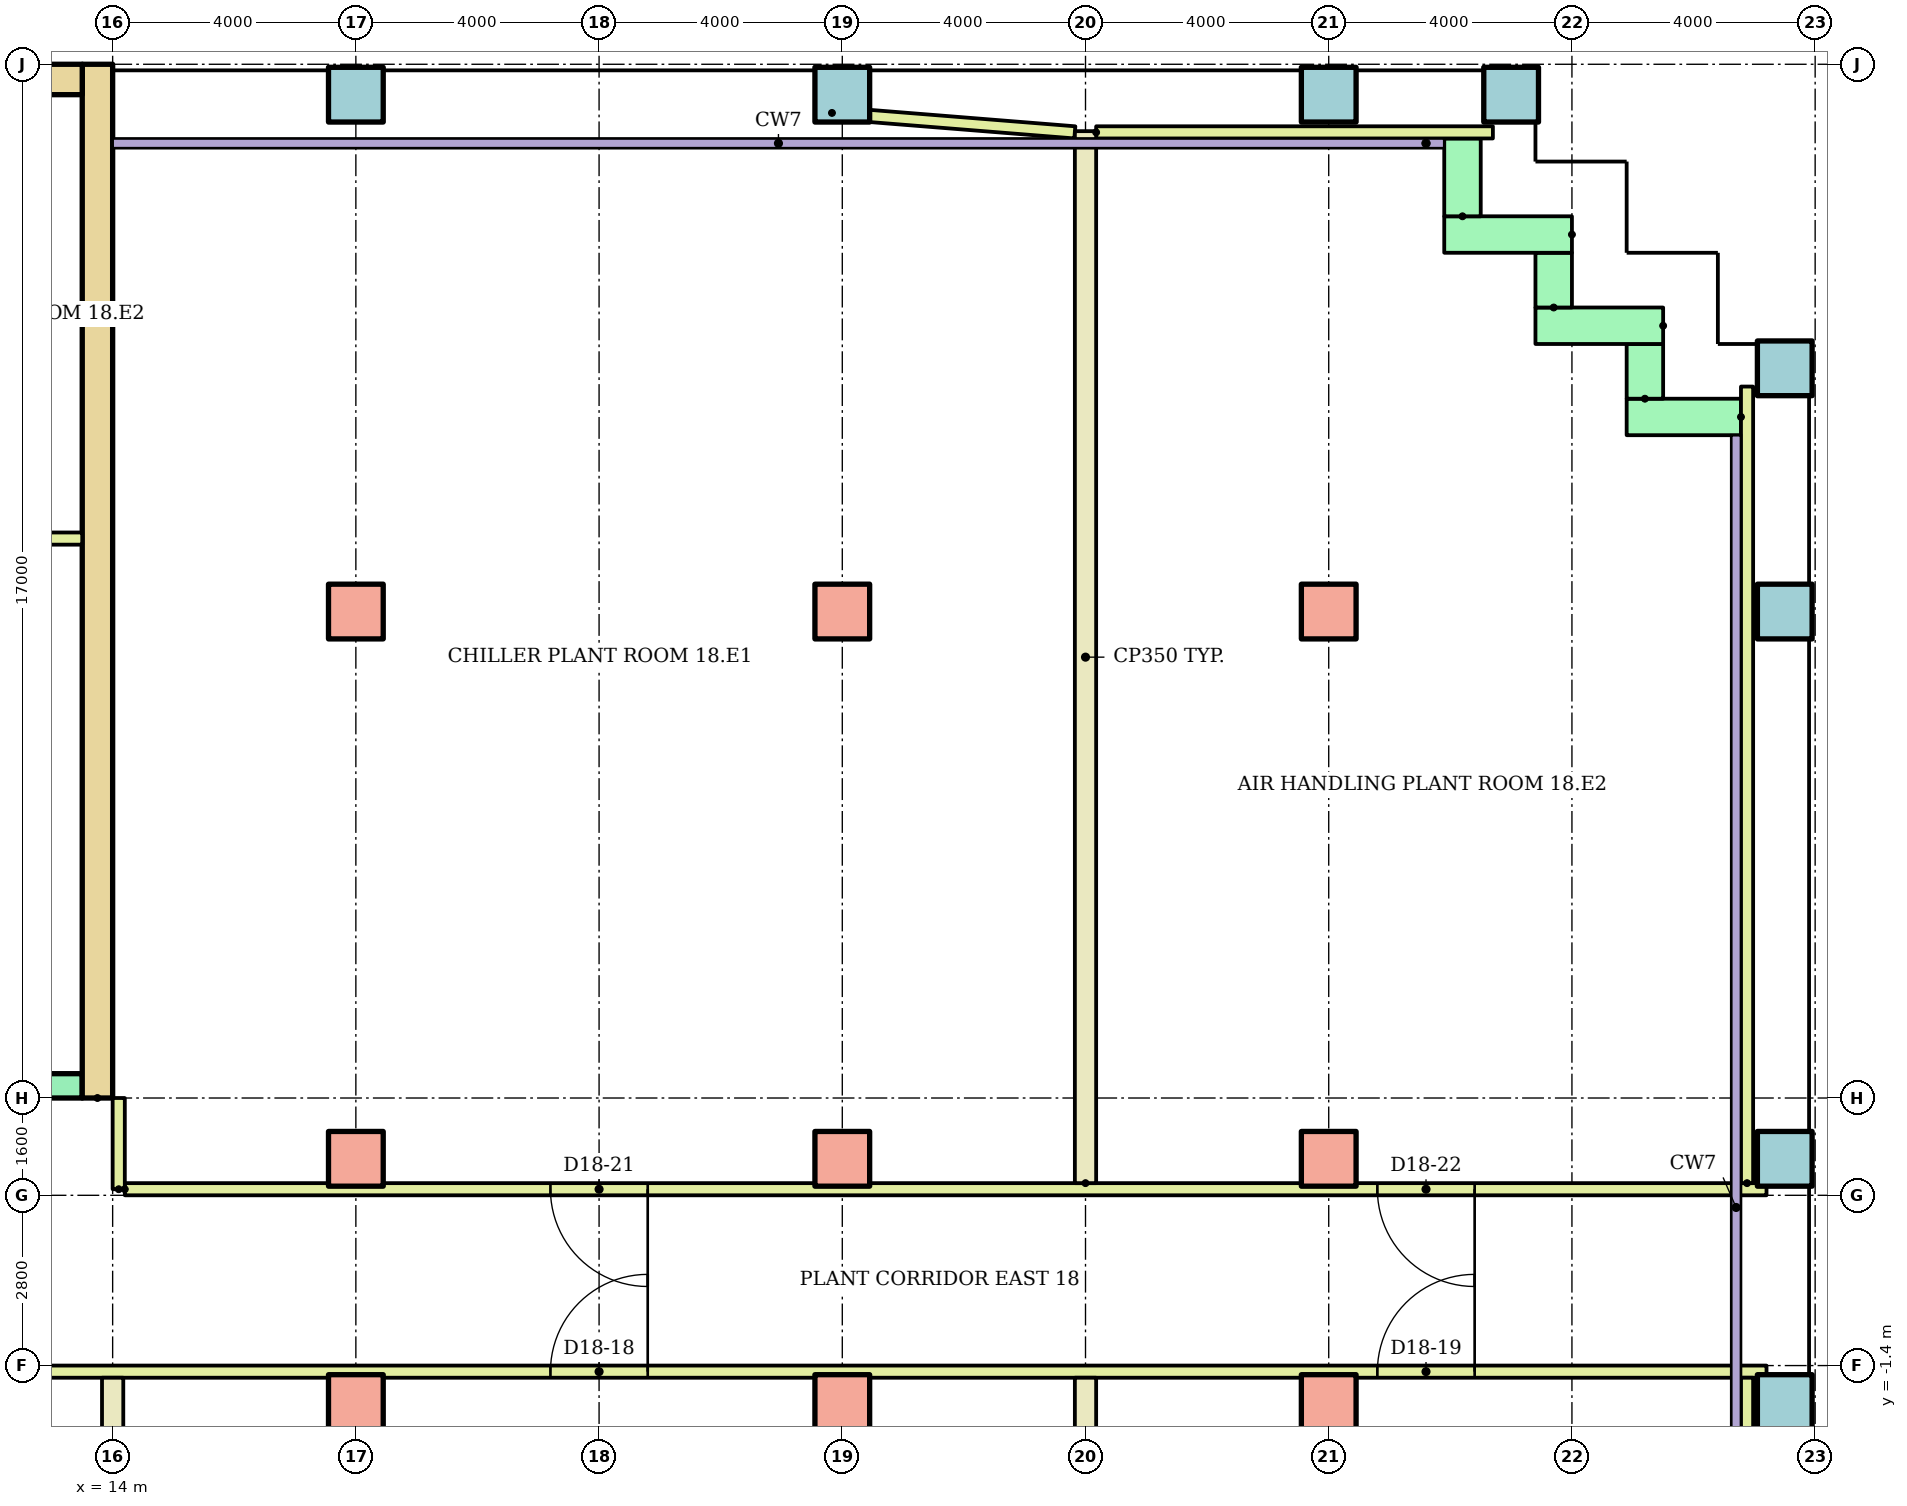
"""IFC4 building model, lengths in metres.
Left out: names, types, materials, properties, quantities, classifications, styles, units other than length and angle.
Written with IfcOpenShell. Run it as: python <this file> out.ifc"""

import sys

from ifc_helpers import new_model, si_unit, direction, frame, frame_2d, origin, origin_2d, place, context, subcontext, project, spatial, rectangle, hollow_rectangle, extrude, element, fill, save


model = new_model("IFC4")
c1 = context("Model", 3, precision=1e-05, world=origin(), true_north=direction((0.0, 1.0)))
c2 = subcontext(c1, "Body", "Model", "MODEL_VIEW")
j1 = project(units=[si_unit("LENGTHUNIT", "METRE"), si_unit("PLANEANGLEUNIT", "RADIAN")], contexts=[c1])
p1 = place(None, origin())
s1 = spatial("IfcSite", under=j1, at=p1, CompositionType="ELEMENT")
p2 = place(p1, origin())
s2 = spatial("IfcBuilding", under=s1, at=p2, CompositionType="ELEMENT")
p3 = place(p2, frame((0.0, 0.0, 73.6)))
s3 = spatial("IfcBuildingStorey", under=s2, at=p3, CompositionType="ELEMENT", Elevation=73.6)
for number, where in (
    (1, (18.0, -2.0, 0.0)),
    (2, (26.0, -2.0, 0.0)),
    (3, (34.0, -2.0, 0.0)),
):
    element("IfcColumn", number, at=place(p3, frame(where)), inside=s3, PredefinedType="COLUMN", context=c2, shape_type="SweptSolid", body=[
        extrude(rectangle(XDim=0.9, YDim=0.9, at=origin_2d()), origin(), (0.0, 0.0, 1.0), 3.9),
    ])
p4 = place(p3, frame((41.5, -2.0, 0.0)))
e4 = element("IfcColumn", 4, at=p4, inside=s3, PredefinedType="COLUMN", context=c2, shape_type="SweptSolid", body=[
    extrude(hollow_rectangle(XDim=0.9, YDim=0.9, WallThickness=0.045, at=origin_2d()), origin(), (0.0, 0.0, 1.0), 3.9),
])
for number, where in (
    (5, (18.0, 2.0, 0.0)),
    (6, (26.0, 2.0, 0.0)),
    (7, (34.0, 2.0, 0.0)),
):
    element("IfcColumn", number, at=place(p3, frame(where)), inside=s3, PredefinedType="COLUMN", context=c2, shape_type="SweptSolid", body=[
        extrude(rectangle(XDim=0.9, YDim=0.9, at=origin_2d()), origin(), (0.0, 0.0, 1.0), 3.9),
    ])
p5 = place(p3, frame((41.5, 2.0, 0.0)))
e8 = element("IfcColumn", 8, at=p5, inside=s3, PredefinedType="COLUMN", context=c2, shape_type="SweptSolid", body=[
    extrude(hollow_rectangle(XDim=0.9, YDim=0.9, WallThickness=0.045, at=origin_2d()), origin(), (0.0, 0.0, 1.0), 3.9),
])
for number, where in (
    (9, (18.0, 11.0, 0.0)),
    (10, (26.0, 11.0, 0.0)),
    (11, (34.0, 11.0, 0.0)),
):
    element("IfcColumn", number, at=place(p3, frame(where)), inside=s3, PredefinedType="COLUMN", context=c2, shape_type="SweptSolid", body=[
        extrude(rectangle(XDim=0.9, YDim=0.9, at=origin_2d()), origin(), (0.0, 0.0, 1.0), 3.9),
    ])
for number, where in (
    (12, (41.5, 11.0, 0.0)),
    (13, (41.5, 15.0, 0.0)),
    (14, (18.0, 19.5, 0.0)),
    (15, (26.0, 19.5, 0.0)),
    (16, (34.0, 19.5, 0.0)),
    (17, (37.0, 19.5, 0.0)),
):
    element("IfcColumn", number, at=place(p3, frame(where)), inside=s3, PredefinedType="COLUMN", context=c2, shape_type="SweptSolid", body=[
        extrude(hollow_rectangle(XDim=0.9, YDim=0.9, WallThickness=0.045, at=origin_2d()), origin(), (0.0, 0.0, 1.0), 3.9),
    ])
p6 = place(p3, frame((40.78, 14.2, 0.0), z_axis=(0.0, 0.0, 1.0), x_axis=(-1.0, 0.0, 0.0)))
e18 = element("IfcWall", 18, at=p6, inside=s3, PredefinedType="STANDARD", context=c2, shape_type="SweptSolid", body=[
    extrude(rectangle(XDim=1.88, YDim=0.6, at=frame_2d((0.94, 0.0))), origin(), (0.0, 0.0, 1.0), 3.62),
])
p7 = place(p3, frame((39.2, 14.5, 0.0), z_axis=(0.0, 0.0, 1.0), x_axis=(0.0, 1.0, 0.0)))
e19 = element("IfcWall", 19, at=p7, inside=s3, PredefinedType="STANDARD", context=c2, shape_type="SweptSolid", body=[
    extrude(rectangle(XDim=0.9, YDim=0.6, at=frame_2d((0.45, 0.0))), origin(), (0.0, 0.0, 1.0), 3.62),
])
p8 = place(p3, frame((39.5, 15.7, 0.0), z_axis=(0.0, 0.0, 1.0), x_axis=(-1.0, 0.0, 0.0)))
e20 = element("IfcWall", 20, at=p8, inside=s3, PredefinedType="STANDARD", context=c2, shape_type="SweptSolid", body=[
    extrude(rectangle(XDim=2.1, YDim=0.6, at=frame_2d((1.05, 0.0))), origin(), (0.0, 0.0, 1.0), 3.62),
])
p9 = place(p3, frame((37.7, 16.0, 0.0), z_axis=(0.0, 0.0, 1.0), x_axis=(0.0, 1.0, 0.0)))
e21 = element("IfcWall", 21, at=p9, inside=s3, PredefinedType="STANDARD", context=c2, shape_type="SweptSolid", body=[
    extrude(rectangle(XDim=0.9, YDim=0.6, at=frame_2d((0.45, 0.0))), origin(), (0.0, 0.0, 1.0), 3.62),
])
p10 = place(p3, frame((38.0, 17.2, 0.0), z_axis=(0.0, 0.0, 1.0), x_axis=(-1.0, 0.0, 0.0)))
e22 = element("IfcWall", 22, at=p10, inside=s3, PredefinedType="STANDARD", context=c2, shape_type="SweptSolid", body=[
    extrude(rectangle(XDim=2.1, YDim=0.6, at=frame_2d((1.05, 0.0))), origin(), (0.0, 0.0, 1.0), 3.62),
])
p11 = place(p3, frame((36.2, 17.5, 0.0), z_axis=(0.0, 0.0, 1.0), x_axis=(0.0, 1.0, 0.0)))
e23 = element("IfcWall", 23, at=p11, inside=s3, PredefinedType="STANDARD", context=c2, shape_type="SweptSolid", body=[
    extrude(rectangle(XDim=1.28, YDim=0.6, at=frame_2d((0.64, 0.0))), origin(), (0.0, 0.0, 1.0), 3.62),
])
p12 = place(p3, frame((13.75, 3.0, 0.0), z_axis=(0.0, 0.0, 1.0), x_axis=(0.0, 1.0, 0.0)))
e24 = element("IfcWall", 24, at=p12, inside=s3, PredefinedType="SHEAR", context=c2, shape_type="SweptSolid", body=[
    extrude(rectangle(XDim=17.0, YDim=0.5, at=frame_2d((8.5, 0.0))), origin(), (0.0, 0.0, 1.0), 3.62),
])
p13 = place(p3, frame((-13.5, 19.75, 0.0)))
e25 = element("IfcWall", 25, at=p13, inside=s3, PredefinedType="SHEAR", context=c2, shape_type="SweptSolid", body=[
    extrude(rectangle(XDim=27.0, YDim=0.5, at=frame_2d((13.5, 0.0))), origin(), (0.0, 0.0, 1.0), 3.62),
])
p14 = place(p3, frame((-13.5, 3.2, 0.0)))
e26 = element("IfcWall", 26, at=p14, inside=s3, PredefinedType="SHEAR", context=c2, shape_type="SweptSolid", body=[
    extrude(rectangle(XDim=27.0, YDim=0.4, at=frame_2d((13.5, 0.0))), origin(), (0.0, 0.0, 1.0), 3.62),
])
p15 = place(p14, frame((6.861, 0.0, 0.0)))
e27 = element("IfcOpeningElement", 27, at=p15, cuts=e26, PredefinedType="OPENING", context=c2, shape_type="SweptSolid", body=[
    extrude(rectangle(XDim=1.1, YDim=2.1, at=frame_2d((0.55, 1.05))), frame((0.0, 0.21, 0.0), z_axis=(0.0, -1.0, 0.0), x_axis=(1.0, 0.0, 0.0)), (0.0, 0.0, 1.0), 0.42),
])
p16 = place(p14, frame((9.906, 0.0, 0.0)))
e28 = element("IfcOpeningElement", 28, at=p16, cuts=e26, PredefinedType="OPENING", context=c2, shape_type="SweptSolid", body=[
    extrude(rectangle(XDim=1.1, YDim=2.1, at=frame_2d((0.55, 1.05))), frame((0.0, 0.21, 0.0), z_axis=(0.0, -1.0, 0.0), x_axis=(1.0, 0.0, 0.0)), (0.0, 0.0, 1.0), 0.42),
])
p17 = place(p14, frame((15.994, 0.0, 0.0)))
e29 = element("IfcOpeningElement", 29, at=p17, cuts=e26, PredefinedType="OPENING", context=c2, shape_type="SweptSolid", body=[
    extrude(rectangle(XDim=1.1, YDim=2.1, at=frame_2d((0.55, 1.05))), frame((0.0, 0.21, 0.0), z_axis=(0.0, -1.0, 0.0), x_axis=(1.0, 0.0, 0.0)), (0.0, 0.0, 1.0), 0.42),
])
p18 = place(p14, frame((19.039, 0.0, 0.0)))
e30 = element("IfcOpeningElement", 30, at=p18, cuts=e26, PredefinedType="OPENING", context=c2, shape_type="SweptSolid", body=[
    extrude(rectangle(XDim=1.1, YDim=2.1, at=frame_2d((0.55, 1.05))), frame((0.0, 0.21, 0.0), z_axis=(0.0, -1.0, 0.0), x_axis=(1.0, 0.0, 0.0)), (0.0, 0.0, 1.0), 0.42),
])
p19 = place(p14, frame((12.6, 0.0, 0.0)))
e31 = element("IfcOpeningElement", 31, at=p19, cuts=e26, PredefinedType="OPENING", context=c2, shape_type="SweptSolid", body=[
    extrude(rectangle(XDim=1.8, YDim=2.1, at=frame_2d((0.9, 1.05))), frame((0.0, 0.21, 0.0), z_axis=(0.0, -1.0, 0.0), x_axis=(1.0, 0.0, 0.0)), (0.0, 0.0, 1.0), 0.42),
])
p20 = place(p3, frame((9.6, 12.2, 0.0)))
e32 = element("IfcWall", 32, at=p20, inside=s3, PredefinedType="PARTITIONING", context=c2, shape_type="SweptSolid", body=[
    extrude(rectangle(XDim=3.9, YDim=0.2, at=frame_2d((1.95, 0.0))), origin(), (0.0, 0.0, 1.0), 3.62),
])
p21 = place(p3, frame((-28.4, -1.5, 0.0)))
e33 = element("IfcWall", 33, at=p21, inside=s3, PredefinedType="PARTITIONING", context=c2, shape_type="SweptSolid", body=[
    extrude(rectangle(XDim=69.6, YDim=0.2, at=frame_2d((34.8, 0.0))), origin(), (0.0, 0.0, 1.0), 3.62),
])
p22 = place(p21, frame((7.2, 0.0, 0.0)))
e34 = element("IfcOpeningElement", 34, at=p22, cuts=e33, PredefinedType="OPENING", context=c2, shape_type="SweptSolid", body=[
    extrude(rectangle(XDim=1.0, YDim=2.4, at=frame_2d((0.5, 1.2))), frame((0.0, 0.11, 0.0), z_axis=(0.0, -1.0, 0.0), x_axis=(1.0, 0.0, 0.0)), (0.0, 0.0, 1.0), 0.22),
])
p23 = place(p21, frame((20.0, 0.0, 0.0)))
e35 = element("IfcOpeningElement", 35, at=p23, cuts=e33, PredefinedType="OPENING", context=c2, shape_type="SweptSolid", body=[
    extrude(rectangle(XDim=1.5, YDim=2.1, at=frame_2d((0.75, 1.05))), frame((0.0, 0.11, 0.0), z_axis=(0.0, -1.0, 0.0), x_axis=(1.0, 0.0, 0.0)), (0.0, 0.0, 1.0), 0.22),
])
p24 = place(p21, frame((34.6, 0.0, 0.0)))
e36 = element("IfcOpeningElement", 36, at=p24, cuts=e33, PredefinedType="OPENING", context=c2, shape_type="SweptSolid", body=[
    extrude(rectangle(XDim=1.5, YDim=2.1, at=frame_2d((0.75, 1.05))), frame((0.0, 0.11, 0.0), z_axis=(0.0, -1.0, 0.0), x_axis=(1.0, 0.0, 0.0)), (0.0, 0.0, 1.0), 0.22),
])
p25 = place(p21, frame((49.6, 0.0, 0.0)))
e37 = element("IfcOpeningElement", 37, at=p25, cuts=e33, PredefinedType="OPENING", context=c2, shape_type="SweptSolid", body=[
    extrude(rectangle(XDim=1.6, YDim=2.4, at=frame_2d((0.8, 1.2))), frame((0.0, 0.11, 0.0), z_axis=(0.0, -1.0, 0.0), x_axis=(1.0, 0.0, 0.0)), (0.0, 0.0, 1.0), 0.22),
])
p26 = place(p21, frame((63.2, 0.0, 0.0)))
e38 = element("IfcOpeningElement", 38, at=p26, cuts=e33, PredefinedType="OPENING", context=c2, shape_type="SweptSolid", body=[
    extrude(rectangle(XDim=1.6, YDim=2.4, at=frame_2d((0.8, 1.2))), frame((0.0, 0.11, 0.0), z_axis=(0.0, -1.0, 0.0), x_axis=(1.0, 0.0, 0.0)), (0.0, 0.0, 1.0), 0.22),
])
p27 = place(p3, frame((14.2, 1.5, 0.0)))
e39 = element("IfcWall", 39, at=p27, inside=s3, PredefinedType="PARTITIONING", context=c2, shape_type="SweptSolid", body=[
    extrude(rectangle(XDim=27.0, YDim=0.2, at=frame_2d((13.5, 0.0))), origin(), (0.0, 0.0, 1.0), 3.62),
])
p28 = place(p27, frame((7.0, 0.0, 0.0)))
e40 = element("IfcOpeningElement", 40, at=p28, cuts=e39, PredefinedType="OPENING", context=c2, shape_type="SweptSolid", body=[
    extrude(rectangle(XDim=1.6, YDim=2.4, at=frame_2d((0.8, 1.2))), frame((0.0, 0.11, 0.0), z_axis=(0.0, -1.0, 0.0), x_axis=(1.0, 0.0, 0.0)), (0.0, 0.0, 1.0), 0.22),
])
p29 = place(p27, frame((20.6, 0.0, 0.0)))
e41 = element("IfcOpeningElement", 41, at=p29, cuts=e39, PredefinedType="OPENING", context=c2, shape_type="SweptSolid", body=[
    extrude(rectangle(XDim=1.6, YDim=2.4, at=frame_2d((0.8, 1.2))), frame((0.0, 0.11, 0.0), z_axis=(0.0, -1.0, 0.0), x_axis=(1.0, 0.0, 0.0)), (0.0, 0.0, 1.0), 0.22),
])
p30 = place(p3, frame((14.1, 1.5, 0.0), z_axis=(0.0, 0.0, 1.0), x_axis=(0.0, 1.0, 0.0)))
e42 = element("IfcWall", 42, at=p30, inside=s3, PredefinedType="PARTITIONING", context=c2, shape_type="SweptSolid", body=[
    extrude(rectangle(XDim=1.5, YDim=0.2, at=frame_2d((0.75, 0.0))), origin(), (0.0, 0.0, 1.0), 3.62),
])
p31 = place(p3, frame((40.88, -12.3, 0.0), z_axis=(0.0, 0.0, 1.0), x_axis=(0.0, 1.0, 0.0)))
e43 = element("IfcWall", 43, at=p31, inside=s3, PredefinedType="PARTITIONING", context=c2, shape_type="SweptSolid", body=[
    extrude(rectangle(XDim=10.7, YDim=0.2, at=frame_2d((5.35, 0.0))), origin(), (0.0, 0.0, 1.0), 3.62),
])
p32 = place(p3, frame((14.0, -16.8, 0.0), z_axis=(0.0, 0.0, 1.0), x_axis=(0.0, 1.0, 0.0)))
e44 = element("IfcWall", 44, at=p32, inside=s3, PredefinedType="PARTITIONING", context=c2, shape_type="SweptSolid", body=[
    extrude(rectangle(XDim=15.2, YDim=0.35, at=frame_2d((7.6, 0.0))), origin(), (0.0, 0.0, 1.0), 3.62),
])
p33 = place(p3, frame((30.0, -16.5, 0.0), z_axis=(0.0, 0.0, 1.0), x_axis=(0.0, 1.0, 0.0)))
e45 = element("IfcWall", 45, at=p33, inside=s3, PredefinedType="PARTITIONING", context=c2, shape_type="SweptSolid", body=[
    extrude(rectangle(XDim=14.9, YDim=0.35, at=frame_2d((7.45, 0.0))), origin(), (0.0, 0.0, 1.0), 3.62),
])
p34 = place(p3, frame((25.83, 19.2, 0.0), z_axis=(0.0, 0.0, 1.0), x_axis=(0.996805780234, -0.079863862243, 0.0)))
e46 = element("IfcWall", 46, at=p34, inside=s3, PredefinedType="PARTITIONING", context=c2, shape_type="SweptSolid", body=[
    extrude(rectangle(XDim=4.008, YDim=0.2, at=frame_2d((2.004, 0.0))), origin(), (0.0, 0.0, 1.0), 3.62),
])
p35 = place(p3, frame((40.88, 1.6, 0.0), z_axis=(0.0, 0.0, 1.0), x_axis=(0.0, 1.0, 0.0)))
e47 = element("IfcWall", 47, at=p35, inside=s3, PredefinedType="PARTITIONING", context=c2, shape_type="SweptSolid", body=[
    extrude(rectangle(XDim=13.1, YDim=0.2, at=frame_2d((6.55, 0.0))), origin(), (0.0, 0.0, 1.0), 3.62),
])
p36 = place(p3, frame((30.175, 18.88, 0.0)))
e48 = element("IfcWall", 48, at=p36, inside=s3, PredefinedType="PARTITIONING", context=c2, shape_type="SweptSolid", body=[
    extrude(rectangle(XDim=6.525, YDim=0.2, at=frame_2d((3.262, 0.0))), origin(), (0.0, 0.0, 1.0), 3.62),
])
p37 = place(p3, frame((30.0, 1.6, 0.0), z_axis=(0.0, 0.0, 1.0), x_axis=(0.0, 1.0, 0.0)))
e49 = element("IfcWall", 49, at=p37, inside=s3, PredefinedType="PARTITIONING", context=c2, shape_type="SweptSolid", body=[
    extrude(rectangle(XDim=17.3, YDim=0.35, at=frame_2d((8.65, 0.0))), origin(), (0.0, 0.0, 1.0), 3.62),
])
p38 = place(p25, origin())
e50 = element("IfcDoor", 50, at=p38, inside=s3, OperationType="DOUBLE_DOOR_SINGLE_SWING", PredefinedType="DOOR", context=c2, shape_type="SweptSolid", body=[
    extrude(rectangle(XDim=1.6, YDim=2.4, at=frame_2d((0.8, 1.2))), frame((0.0, 0.025, 0.0), z_axis=(0.0, -1.0, 0.0), x_axis=(1.0, 0.0, 0.0)), (0.0, 0.0, 1.0), 0.05),
])
fill(e37, e50)
p39 = place(p26, origin())
e51 = element("IfcDoor", 51, at=p39, inside=s3, OperationType="DOUBLE_DOOR_SINGLE_SWING", PredefinedType="DOOR", context=c2, shape_type="SweptSolid", body=[
    extrude(rectangle(XDim=1.6, YDim=2.4, at=frame_2d((0.8, 1.2))), frame((0.0, 0.025, 0.0), z_axis=(0.0, -1.0, 0.0), x_axis=(1.0, 0.0, 0.0)), (0.0, 0.0, 1.0), 0.05),
])
fill(e38, e51)
p40 = place(p28, frame((1.6, 0.0, 0.0), z_axis=(0.0, 0.0, 1.0), x_axis=(-1.0, 0.0, 0.0)))
e52 = element("IfcDoor", 52, at=p40, inside=s3, OperationType="DOUBLE_DOOR_SINGLE_SWING", PredefinedType="DOOR", context=c2, shape_type="SweptSolid", body=[
    extrude(rectangle(XDim=1.6, YDim=2.4, at=frame_2d((0.8, 1.2))), frame((0.0, 0.025, 0.0), z_axis=(0.0, -1.0, 0.0), x_axis=(1.0, 0.0, 0.0)), (0.0, 0.0, 1.0), 0.05),
])
fill(e40, e52)
p41 = place(p29, frame((1.6, 0.0, 0.0), z_axis=(0.0, 0.0, 1.0), x_axis=(-1.0, 0.0, 0.0)))
e53 = element("IfcDoor", 53, at=p41, inside=s3, OperationType="DOUBLE_DOOR_SINGLE_SWING", PredefinedType="DOOR", context=c2, shape_type="SweptSolid", body=[
    extrude(rectangle(XDim=1.6, YDim=2.4, at=frame_2d((0.8, 1.2))), frame((0.0, 0.025, 0.0), z_axis=(0.0, -1.0, 0.0), x_axis=(1.0, 0.0, 0.0)), (0.0, 0.0, 1.0), 0.05),
])
fill(e41, e53)
save(model, sys.argv[1])
